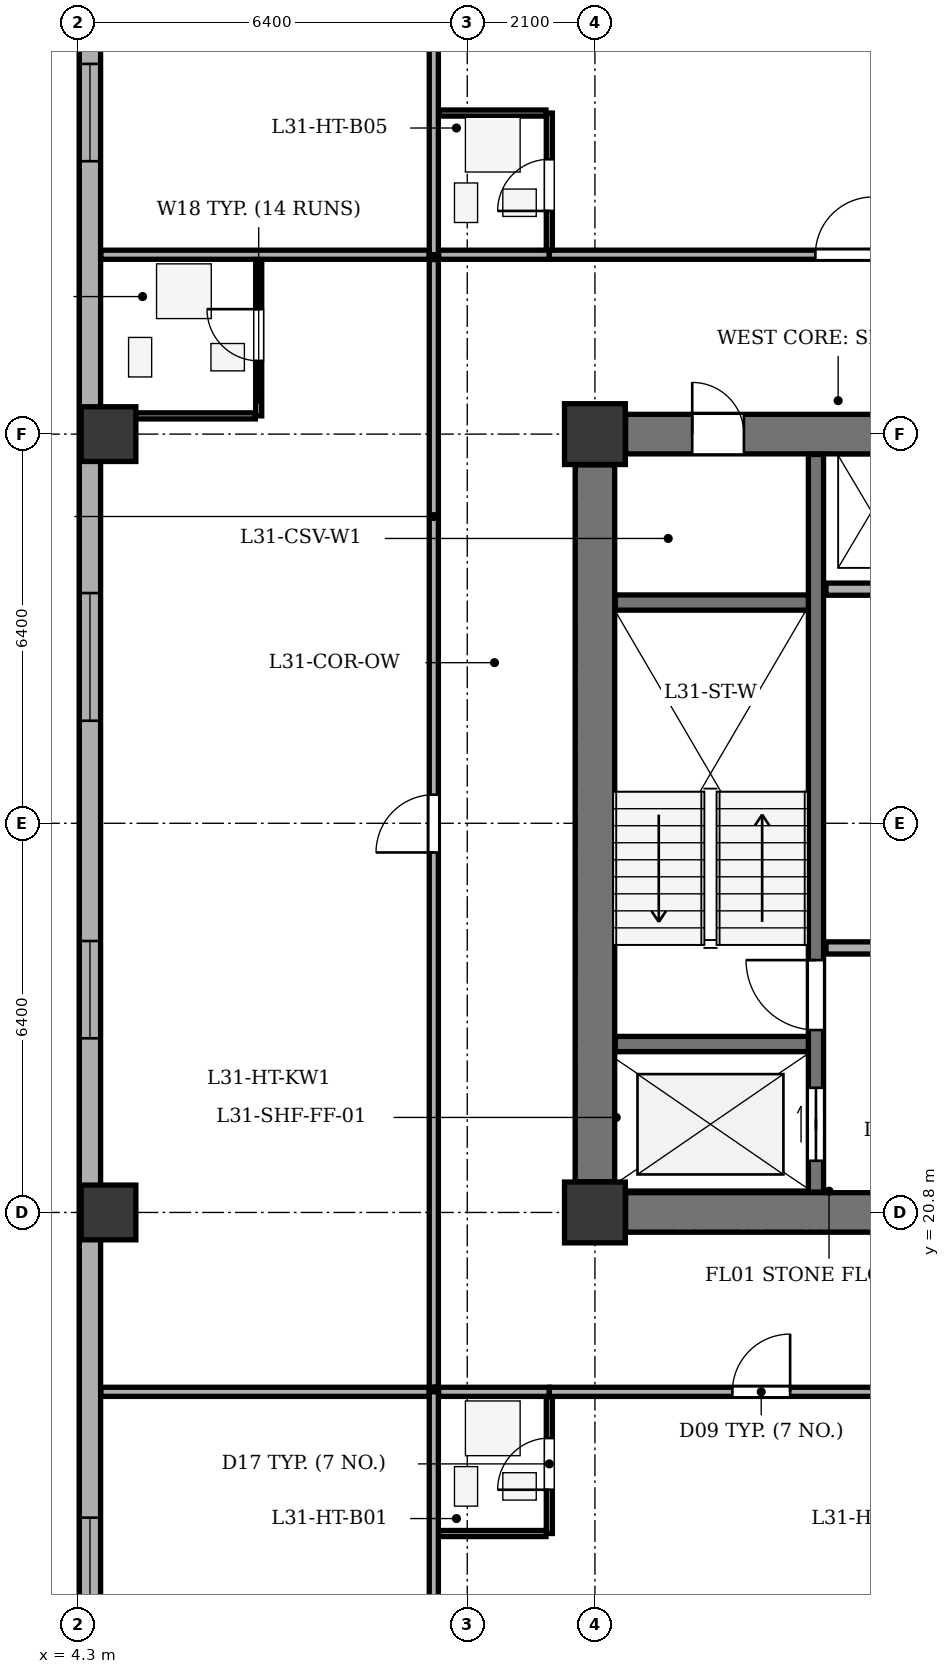
"""IFC4 building model, lengths in metres.
Left out: names, types, materials, properties, quantities, classifications, styles, units other than length and angle.
Written with IfcOpenShell. Run it as: python <this file> out.ifc"""

import sys

from ifc_helpers import new_model, si_unit, direction, frame, frame_2d, origin, origin_2d, place, context, subcontext, project, spatial, rectangle, extrude, element, fill, save


model = new_model("IFC4")
c1 = context("Model", 3, precision=1e-05, world=origin(), true_north=direction((0.0, 1.0)))
c2 = subcontext(c1, "Body", "Model", "MODEL_VIEW")
j1 = project(units=[si_unit("LENGTHUNIT", "METRE"), si_unit("PLANEANGLEUNIT", "RADIAN")], contexts=[c1])
p1 = place(None, origin())
s1 = spatial("IfcSite", under=j1, at=p1, CompositionType="ELEMENT")
p2 = place(p1, origin())
s2 = spatial("IfcBuilding", under=s1, at=p2, CompositionType="ELEMENT")
p3 = place(p2, frame((0.0, 0.0, 127.3)))
s3 = spatial("IfcBuildingStorey", under=s2, at=p3, CompositionType="ELEMENT", Elevation=127.3)
for number, where, z_axis, x_axis in (
    (1, (12.8, 20.8, 0.0), (0.0, 0.0, 1.0), (1.0, 0.0, 0.0)),
    (2, (12.8, 33.6, 0.0), (0.0, 0.0, 1.0), (1.0, 0.0, 0.0)),
):
    element("IfcColumn", number, at=place(p3, frame(where, z_axis=z_axis, x_axis=x_axis)), inside=s3, PredefinedType="COLUMN", context=c2, shape_type="SweptSolid", body=[
        extrude(rectangle(XDim=1.0, YDim=1.0, at=origin_2d()), origin(), (0.0, 0.0, 1.0), 3.5),
    ])
for number, where, z_axis, x_axis in (
    (3, (4.8, 20.8, 0.0), (0.0, 0.0, 1.0), (1.0, 0.0, 0.0)),
    (4, (4.8, 33.6, 0.0), (0.0, 0.0, 1.0), (1.0, 0.0, 0.0)),
):
    element("IfcColumn", number, at=place(p3, frame(where, z_axis=z_axis, x_axis=x_axis)), inside=s3, PredefinedType="COLUMN", context=c2, shape_type="SweptSolid", body=[
        extrude(rectangle(XDim=0.9, YDim=0.9, at=origin_2d()), origin(), (0.0, 0.0, 1.0), 3.5),
    ])
p4 = place(p3, frame((4.495, 6.5, 0.0), z_axis=(0.0, 0.0, 1.0), x_axis=(0.0, 1.0, 0.0)))
e5 = element("IfcWall", 5, at=p4, inside=s3, PredefinedType="STANDARD", context=c2, shape_type="SweptSolid", body=[
    extrude(rectangle(XDim=35.0, YDim=0.35, at=frame_2d((17.5, 0.0))), origin(), (0.0, 0.0, 1.0), 2.785),
])
p5 = place(p4, frame((2.595, 0.0, 0.75)))
e6 = element("IfcOpeningElement", 6, at=p5, cuts=e5, PredefinedType="OPENING", context=c2, shape_type="SweptSolid", body=[
    extrude(rectangle(XDim=1.6, YDim=1.75, at=frame_2d((0.8, 0.875))), frame((0.0, 0.185, 0.0), z_axis=(0.0, -1.0, 0.0), x_axis=(1.0, 0.0, 0.0)), (0.0, 0.0, 1.0), 0.37),
])
p6 = place(p4, frame((7.181, 0.0, 0.75)))
e7 = element("IfcOpeningElement", 7, at=p6, cuts=e5, PredefinedType="OPENING", context=c2, shape_type="SweptSolid", body=[
    extrude(rectangle(XDim=2.1, YDim=1.75, at=frame_2d((1.05, 0.875))), frame((0.0, 0.185, 0.0), z_axis=(0.0, -1.0, 0.0), x_axis=(1.0, 0.0, 0.0)), (0.0, 0.0, 1.0), 0.37),
])
p7 = place(p4, frame((17.164, 0.0, 0.75)))
e8 = element("IfcOpeningElement", 8, at=p7, cuts=e5, PredefinedType="OPENING", context=c2, shape_type="SweptSolid", body=[
    extrude(rectangle(XDim=1.6, YDim=1.75, at=frame_2d((0.8, 0.875))), frame((0.0, 0.185, 0.0), z_axis=(0.0, -1.0, 0.0), x_axis=(1.0, 0.0, 0.0)), (0.0, 0.0, 1.0), 0.37),
])
p8 = place(p4, frame((22.386, 0.0, 0.75)))
e9 = element("IfcOpeningElement", 9, at=p8, cuts=e5, PredefinedType="OPENING", context=c2, shape_type="SweptSolid", body=[
    extrude(rectangle(XDim=2.1, YDim=1.75, at=frame_2d((1.05, 0.875))), frame((0.0, 0.185, 0.0), z_axis=(0.0, -1.0, 0.0), x_axis=(1.0, 0.0, 0.0)), (0.0, 0.0, 1.0), 0.37),
])
p9 = place(p4, frame((31.588, 0.0, 0.75)))
e10 = element("IfcOpeningElement", 10, at=p9, cuts=e5, PredefinedType="OPENING", context=c2, shape_type="SweptSolid", body=[
    extrude(rectangle(XDim=1.6, YDim=1.75, at=frame_2d((0.8, 0.875))), frame((0.0, 0.185, 0.0), z_axis=(0.0, -1.0, 0.0), x_axis=(1.0, 0.0, 0.0)), (0.0, 0.0, 1.0), 0.37),
])
p10 = place(p3, frame((12.8, 21.305, 0.0), z_axis=(0.0, 0.0, 1.0), x_axis=(0.0, 1.0, 0.0)))
e11 = element("IfcWall", 11, at=p10, inside=s3, PredefinedType="SHEAR", context=c2, shape_type="SweptSolid", body=[
    extrude(rectangle(XDim=11.79, YDim=0.65, at=frame_2d((5.895, 0.0))), origin(), (0.0, 0.0, 1.0), 3.2),
])
p11 = place(p3, frame((13.305, 20.8, 0.0), z_axis=(0.0, 0.0, 1.0), x_axis=(1.0, 0.0, 0.0)))
e12 = element("IfcWall", 12, at=p11, inside=s3, PredefinedType="SHEAR", context=c2, shape_type="SweptSolid", body=[
    extrude(rectangle(XDim=6.99, YDim=0.65, at=frame_2d((3.495, 0.0))), origin(), (0.0, 0.0, 1.0), 3.2),
])
p12 = place(p3, frame((13.305, 33.6, 0.0), z_axis=(0.0, 0.0, 1.0), x_axis=(1.0, 0.0, 0.0)))
e13 = element("IfcWall", 13, at=p12, inside=s3, PredefinedType="SHEAR", context=c2, shape_type="SweptSolid", body=[
    extrude(rectangle(XDim=6.99, YDim=0.65, at=frame_2d((3.495, 0.0))), origin(), (0.0, 0.0, 1.0), 3.2),
])
p13 = place(p12, frame((1.095, 0.0, 0.0)))
e14 = element("IfcOpeningElement", 14, at=p13, cuts=e13, PredefinedType="OPENING", context=c2, shape_type="SweptSolid", body=[
    extrude(rectangle(XDim=0.85, YDim=2.02, at=frame_2d((0.425, 1.01))), frame((0.0, 0.335, 0.0), z_axis=(0.0, -1.0, 0.0), x_axis=(1.0, 0.0, 0.0)), (0.0, 0.0, 1.0), 0.67),
])
p14 = place(p3, frame((16.435, 21.135, 0.0), z_axis=(0.0, 0.0, 1.0), x_axis=(0.0, 1.0, 0.0)))
e15 = element("IfcWall", 15, at=p14, inside=s3, PredefinedType="SHEAR", context=c2, shape_type="SweptSolid", body=[
    extrude(rectangle(XDim=12.13, YDim=0.25, at=frame_2d((6.065, 0.0))), origin(), (0.0, 0.0, 1.0), 3.2),
])
p15 = place(p14, frame((0.515, 0.0, 0.0)))
e16 = element("IfcOpeningElement", 16, at=p15, cuts=e15, PredefinedType="OPENING", context=c2, shape_type="SweptSolid", body=[
    extrude(rectangle(XDim=1.2, YDim=2.15, at=frame_2d((0.6, 1.075))), frame((0.0, 0.135, 0.0), z_axis=(0.0, -1.0, 0.0), x_axis=(1.0, 0.0, 0.0)), (0.0, 0.0, 1.0), 0.27),
])
p16 = place(p14, frame((2.665, 0.0, 0.0)))
e17 = element("IfcOpeningElement", 17, at=p16, cuts=e15, PredefinedType="OPENING", context=c2, shape_type="SweptSolid", body=[
    extrude(rectangle(XDim=1.15, YDim=2.15, at=frame_2d((0.575, 1.075))), frame((0.0, 0.135, 0.0), z_axis=(0.0, -1.0, 0.0), x_axis=(1.0, 0.0, 0.0)), (0.0, 0.0, 1.0), 0.27),
])
for number, where, z_axis, x_axis in (
    (18, (13.135, 23.57, 0.0), (0.0, 0.0, 1.0), (1.0, 0.0, 0.0)),
    (19, (13.135, 30.83, 0.0), (0.0, 0.0, 1.0), (1.0, 0.0, 0.0)),
):
    element("IfcWall", number, at=place(p3, frame(where, z_axis=z_axis, x_axis=x_axis)), inside=s3, PredefinedType="SHEAR", context=c2, shape_type="SweptSolid", body=[
        extrude(rectangle(XDim=3.175, YDim=0.25, at=frame_2d((1.587, 0.0))), origin(), (0.0, 0.0, 1.0), 3.2),
    ])
for number, where, z_axis, x_axis in (
    (20, (16.6, 25.15, 0.0), (0.0, 0.0, 1.0), (1.0, 0.0, 0.0)),
    (21, (16.6, 31.05, 0.0), (0.0, 0.0, 1.0), (1.0, 0.0, 0.0)),
):
    element("IfcWall", number, at=place(p3, frame(where, z_axis=z_axis, x_axis=x_axis)), inside=s3, PredefinedType="SOLIDWALL", context=c2, shape_type="SweptSolid", body=[
        extrude(rectangle(XDim=3.85, YDim=0.2, at=frame_2d((1.925, 0.0))), origin(), (0.0, 0.0, 1.0), 3.2),
    ])
p17 = place(p3, frame((10.15, 1.875, 0.0), z_axis=(0.0, 0.0, 1.0), x_axis=(0.0, 1.0, 0.0)))
e22 = element("IfcWall", 22, at=p17, inside=s3, PredefinedType="PARTITIONING", context=c2, shape_type="SweptSolid", body=[
    extrude(rectangle(XDim=15.975, YDim=0.15, at=frame_2d((7.988, 0.0))), origin(), (0.0, 0.0, 1.0), 3.2),
])
p18 = place(p3, frame((10.23, 17.85, 0.0), z_axis=(0.0, 0.0, 1.0), x_axis=(1.0, 0.0, 0.0)))
e23 = element("IfcWall", 23, at=p18, inside=s3, PredefinedType="PARTITIONING", context=c2, shape_type="SweptSolid", body=[
    extrude(rectangle(XDim=1.82, YDim=0.15, at=frame_2d((0.91, 0.0))), origin(), (0.0, 0.0, 1.0), 3.2),
])
p19 = place(p3, frame((12.05, 17.85, 0.0), z_axis=(0.0, 0.0, 1.0), x_axis=(1.0, 0.0, 0.0)))
e24 = element("IfcWall", 24, at=p19, inside=s3, PredefinedType="PARTITIONING", context=c2, shape_type="SweptSolid", body=[
    extrude(rectangle(XDim=6.979, YDim=0.15, at=frame_2d((3.49, 0.0))), origin(), (0.0, 0.0, 1.0), 3.2),
])
p20 = place(p19, frame((3.01, 0.0, 0.0)))
e25 = element("IfcOpeningElement", 25, at=p20, cuts=e24, PredefinedType="OPENING", context=c2, shape_type="SweptSolid", body=[
    extrude(rectangle(XDim=0.95, YDim=2.1, at=frame_2d((0.475, 1.05))), frame((0.0, 0.085, 0.0), z_axis=(0.0, -1.0, 0.0), x_axis=(1.0, 0.0, 0.0)), (0.0, 0.0, 1.0), 0.17),
])
p21 = place(p3, frame((12.05, 15.52, 0.0), z_axis=(0.0, 0.0, 1.0), x_axis=(0.0, 1.0, 0.0)))
e26 = element("IfcWall", 26, at=p21, inside=s3, PredefinedType="PARTITIONING", context=c2, shape_type="SweptSolid", body=[
    extrude(rectangle(XDim=2.25, YDim=0.1, at=frame_2d((1.125, 0.0))), origin(), (0.0, 0.0, 1.0), 3.2),
])
p22 = place(p21, frame((0.72, 0.0, 0.0)))
e27 = element("IfcOpeningElement", 27, at=p22, cuts=e26, PredefinedType="OPENING", context=c2, shape_type="SweptSolid", body=[
    extrude(rectangle(XDim=0.85, YDim=2.05, at=frame_2d((0.425, 1.025))), frame((0.0, 0.06, 0.0), z_axis=(0.0, -1.0, 0.0), x_axis=(1.0, 0.0, 0.0)), (0.0, 0.0, 1.0), 0.12),
])
p23 = place(p3, frame((10.23, 15.52, 0.0), z_axis=(0.0, 0.0, 1.0), x_axis=(1.0, 0.0, 0.0)))
e28 = element("IfcWall", 28, at=p23, inside=s3, PredefinedType="PARTITIONING", context=c2, shape_type="SweptSolid", body=[
    extrude(rectangle(XDim=1.765, YDim=0.1, at=frame_2d((0.883, 0.0))), origin(), (0.0, 0.0, 1.0), 3.2),
])
p24 = place(p3, frame((10.15, 36.55, 0.0), z_axis=(0.0, 0.0, 1.0), x_axis=(0.0, 1.0, 0.0)))
e29 = element("IfcWall", 29, at=p24, inside=s3, PredefinedType="PARTITIONING", context=c2, shape_type="SweptSolid", body=[
    extrude(rectangle(XDim=9.575, YDim=0.15, at=frame_2d((4.788, 0.0))), origin(), (0.0, 0.0, 1.0), 3.2),
])
p25 = place(p3, frame((10.23, 36.55, 0.0), z_axis=(0.0, 0.0, 1.0), x_axis=(1.0, 0.0, 0.0)))
e30 = element("IfcWall", 30, at=p25, inside=s3, PredefinedType="PARTITIONING", context=c2, shape_type="SweptSolid", body=[
    extrude(rectangle(XDim=1.82, YDim=0.15, at=frame_2d((0.91, 0.0))), origin(), (0.0, 0.0, 1.0), 3.2),
])
p26 = place(p3, frame((12.05, 36.55, 0.0), z_axis=(0.0, 0.0, 1.0), x_axis=(1.0, 0.0, 0.0)))
e31 = element("IfcWall", 31, at=p26, inside=s3, PredefinedType="PARTITIONING", context=c2, shape_type="SweptSolid", body=[
    extrude(rectangle(XDim=9.711, YDim=0.15, at=frame_2d((4.855, 0.0))), origin(), (0.0, 0.0, 1.0), 3.2),
])
p27 = place(p26, frame((4.375, 0.0, 0.0)))
e32 = element("IfcOpeningElement", 32, at=p27, cuts=e31, PredefinedType="OPENING", context=c2, shape_type="SweptSolid", body=[
    extrude(rectangle(XDim=0.95, YDim=2.1, at=frame_2d((0.475, 1.05))), frame((0.0, 0.085, 0.0), z_axis=(0.0, -1.0, 0.0), x_axis=(1.0, 0.0, 0.0)), (0.0, 0.0, 1.0), 0.17),
])
p28 = place(p3, frame((12.05, 36.63, 0.0), z_axis=(0.0, 0.0, 1.0), x_axis=(0.0, 1.0, 0.0)))
e33 = element("IfcWall", 33, at=p28, inside=s3, PredefinedType="PARTITIONING", context=c2, shape_type="SweptSolid", body=[
    extrude(rectangle(XDim=2.25, YDim=0.1, at=frame_2d((1.125, 0.0))), origin(), (0.0, 0.0, 1.0), 3.2),
])
p29 = place(p28, frame((0.64, 0.0, 0.0)))
e34 = element("IfcOpeningElement", 34, at=p29, cuts=e33, PredefinedType="OPENING", context=c2, shape_type="SweptSolid", body=[
    extrude(rectangle(XDim=0.85, YDim=2.05, at=frame_2d((0.425, 1.025))), frame((0.0, 0.06, 0.0), z_axis=(0.0, -1.0, 0.0), x_axis=(1.0, 0.0, 0.0)), (0.0, 0.0, 1.0), 0.12),
])
p30 = place(p3, frame((10.23, 38.88, 0.0), z_axis=(0.0, 0.0, 1.0), x_axis=(1.0, 0.0, 0.0)))
e35 = element("IfcWall", 35, at=p30, inside=s3, PredefinedType="PARTITIONING", context=c2, shape_type="SweptSolid", body=[
    extrude(rectangle(XDim=1.765, YDim=0.1, at=frame_2d((0.883, 0.0))), origin(), (0.0, 0.0, 1.0), 3.2),
])
for number, where, z_axis, x_axis in (
    (36, (4.675, 17.85, 0.0), (0.0, 0.0, 1.0), (1.0, 0.0, 0.0)),
    (37, (4.675, 36.55, 0.0), (0.0, 0.0, 1.0), (1.0, 0.0, 0.0)),
):
    element("IfcWall", number, at=place(p3, frame(where, z_axis=z_axis, x_axis=x_axis)), inside=s3, PredefinedType="PARTITIONING", context=c2, shape_type="SweptSolid", body=[
        extrude(rectangle(XDim=5.395, YDim=0.15, at=frame_2d((2.698, 0.0))), origin(), (0.0, 0.0, 1.0), 3.2),
    ])
p31 = place(p3, frame((10.15, 17.93, 0.0), z_axis=(0.0, 0.0, 1.0), x_axis=(0.0, 1.0, 0.0)))
e38 = element("IfcWall", 38, at=p31, inside=s3, PredefinedType="PARTITIONING", context=c2, shape_type="SweptSolid", body=[
    extrude(rectangle(XDim=18.54, YDim=0.15, at=frame_2d((9.27, 0.0))), origin(), (0.0, 0.0, 1.0), 3.2),
])
p32 = place(p31, frame((8.79, 0.0, 0.0)))
e39 = element("IfcOpeningElement", 39, at=p32, cuts=e38, PredefinedType="OPENING", context=c2, shape_type="SweptSolid", body=[
    extrude(rectangle(XDim=0.95, YDim=2.1, at=frame_2d((0.475, 1.05))), frame((0.0, 0.085, 0.0), z_axis=(0.0, -1.0, 0.0), x_axis=(1.0, 0.0, 0.0)), (0.0, 0.0, 1.0), 0.17),
])
p33 = place(p3, frame((7.27, 33.9, 0.0), z_axis=(0.0, 0.0, 1.0), x_axis=(0.0, 1.0, 0.0)))
e40 = element("IfcWall", 40, at=p33, inside=s3, PredefinedType="PARTITIONING", context=c2, shape_type="SweptSolid", body=[
    extrude(rectangle(XDim=2.57, YDim=0.1, at=frame_2d((1.285, 0.0))), origin(), (0.0, 0.0, 1.0), 3.2),
])
p34 = place(p33, frame((0.905, 0.0, 0.0)))
e41 = element("IfcOpeningElement", 41, at=p34, cuts=e40, PredefinedType="OPENING", context=c2, shape_type="SweptSolid", body=[
    extrude(rectangle(XDim=0.85, YDim=2.05, at=frame_2d((0.425, 1.025))), frame((0.0, 0.06, 0.0), z_axis=(0.0, -1.0, 0.0), x_axis=(1.0, 0.0, 0.0)), (0.0, 0.0, 1.0), 0.12),
])
p35 = place(p3, frame((4.675, 33.9, 0.0), z_axis=(0.0, 0.0, 1.0), x_axis=(1.0, 0.0, 0.0)))
e42 = element("IfcWall", 42, at=p35, inside=s3, PredefinedType="PARTITIONING", context=c2, shape_type="SweptSolid", body=[
    extrude(rectangle(XDim=2.54, YDim=0.1, at=frame_2d((1.27, 0.0))), origin(), (0.0, 0.0, 1.0), 2.535),
])
p36 = place(p6, origin())
e43 = element("IfcWindow", 43, at=p36, inside=s3, PartitioningType="SINGLE_PANEL", PredefinedType="WINDOW", context=c2, shape_type="SweptSolid", body=[
    extrude(rectangle(XDim=2.1, YDim=1.75, at=frame_2d((1.05, 0.875))), frame((0.0, -0.01, 0.0), z_axis=(0.0, -1.0, 0.0), x_axis=(1.0, 0.0, 0.0)), (0.0, 0.0, 1.0), 0.06),
])
fill(e7, e43)
p37 = place(p7, origin())
e44 = element("IfcWindow", 44, at=p37, inside=s3, PartitioningType="SINGLE_PANEL", PredefinedType="WINDOW", context=c2, shape_type="SweptSolid", body=[
    extrude(rectangle(XDim=1.6, YDim=1.75, at=frame_2d((0.8, 0.875))), frame((0.0, -0.01, 0.0), z_axis=(0.0, -1.0, 0.0), x_axis=(1.0, 0.0, 0.0)), (0.0, 0.0, 1.0), 0.06),
])
fill(e8, e44)
p38 = place(p8, origin())
e45 = element("IfcWindow", 45, at=p38, inside=s3, PartitioningType="SINGLE_PANEL", PredefinedType="WINDOW", context=c2, shape_type="SweptSolid", body=[
    extrude(rectangle(XDim=2.1, YDim=1.75, at=frame_2d((1.05, 0.875))), frame((0.0, -0.01, 0.0), z_axis=(0.0, -1.0, 0.0), x_axis=(1.0, 0.0, 0.0)), (0.0, 0.0, 1.0), 0.06),
])
fill(e9, e45)
p39 = place(p9, origin())
e46 = element("IfcWindow", 46, at=p39, inside=s3, PartitioningType="SINGLE_PANEL", PredefinedType="WINDOW", context=c2, shape_type="SweptSolid", body=[
    extrude(rectangle(XDim=1.6, YDim=1.75, at=frame_2d((0.8, 0.875))), frame((0.0, -0.01, 0.0), z_axis=(0.0, -1.0, 0.0), x_axis=(1.0, 0.0, 0.0)), (0.0, 0.0, 1.0), 0.06),
])
fill(e10, e46)
p40 = place(p13, origin())
e47 = element("IfcDoor", 47, at=p40, inside=s3, OperationType="SINGLE_SWING_LEFT", PredefinedType="DOOR", context=c2, shape_type="SweptSolid", body=[
    extrude(rectangle(XDim=0.85, YDim=2.02, at=frame_2d((0.425, 1.01))), frame((0.0, 0.025, 0.0), z_axis=(0.0, -1.0, 0.0), x_axis=(1.0, 0.0, 0.0)), (0.0, 0.0, 1.0), 0.05),
])
fill(e14, e47)
p41 = place(p15, origin())
e48 = element("IfcDoor", 48, at=p41, inside=s3, OperationType="DOUBLE_DOOR_SLIDING", PredefinedType="DOOR", context=c2, shape_type="SweptSolid", body=[
    extrude(rectangle(XDim=1.2, YDim=2.15, at=frame_2d((0.6, 1.075))), frame((0.0, 0.025, 0.0), z_axis=(0.0, -1.0, 0.0), x_axis=(1.0, 0.0, 0.0)), (0.0, 0.0, 1.0), 0.05),
])
fill(e16, e48)
p42 = place(p16, origin())
e49 = element("IfcDoor", 49, at=p42, inside=s3, OperationType="SINGLE_SWING_RIGHT", PredefinedType="DOOR", context=c2, shape_type="SweptSolid", body=[
    extrude(rectangle(XDim=1.15, YDim=2.15, at=frame_2d((0.575, 1.075))), frame((0.0, 0.025, 0.0), z_axis=(0.0, -1.0, 0.0), x_axis=(1.0, 0.0, 0.0)), (0.0, 0.0, 1.0), 0.05),
])
fill(e17, e49)
p43 = place(p22, origin())
e50 = element("IfcDoor", 50, at=p43, inside=s3, OperationType="SINGLE_SWING_LEFT", PredefinedType="DOOR", context=c2, shape_type="SweptSolid", body=[
    extrude(rectangle(XDim=0.85, YDim=2.05, at=frame_2d((0.425, 1.025))), frame((0.0, 0.025, 0.0), z_axis=(0.0, -1.0, 0.0), x_axis=(1.0, 0.0, 0.0)), (0.0, 0.0, 1.0), 0.05),
])
fill(e27, e50)
p44 = place(p20, origin())
e51 = element("IfcDoor", 51, at=p44, inside=s3, OperationType="SINGLE_SWING_RIGHT", PredefinedType="DOOR", context=c2, shape_type="SweptSolid", body=[
    extrude(rectangle(XDim=0.95, YDim=2.1, at=frame_2d((0.475, 1.05))), frame((0.0, 0.025, 0.0), z_axis=(0.0, -1.0, 0.0), x_axis=(1.0, 0.0, 0.0)), (0.0, 0.0, 1.0), 0.05),
])
fill(e25, e51)
p45 = place(p29, origin())
e52 = element("IfcDoor", 52, at=p45, inside=s3, OperationType="SINGLE_SWING_LEFT", PredefinedType="DOOR", context=c2, shape_type="SweptSolid", body=[
    extrude(rectangle(XDim=0.85, YDim=2.05, at=frame_2d((0.425, 1.025))), frame((0.0, 0.025, 0.0), z_axis=(0.0, -1.0, 0.0), x_axis=(1.0, 0.0, 0.0)), (0.0, 0.0, 1.0), 0.05),
])
fill(e34, e52)
p46 = place(p27, origin())
e53 = element("IfcDoor", 53, at=p46, inside=s3, OperationType="SINGLE_SWING_RIGHT", PredefinedType="DOOR", context=c2, shape_type="SweptSolid", body=[
    extrude(rectangle(XDim=0.95, YDim=2.1, at=frame_2d((0.475, 1.05))), frame((0.0, 0.025, 0.0), z_axis=(0.0, -1.0, 0.0), x_axis=(1.0, 0.0, 0.0)), (0.0, 0.0, 1.0), 0.05),
])
fill(e32, e53)
p47 = place(p34, origin())
e54 = element("IfcDoor", 54, at=p47, inside=s3, OperationType="SINGLE_SWING_RIGHT", PredefinedType="DOOR", context=c2, shape_type="SweptSolid", body=[
    extrude(rectangle(XDim=0.85, YDim=2.05, at=frame_2d((0.425, 1.025))), frame((0.0, 0.025, 0.0), z_axis=(0.0, -1.0, 0.0), x_axis=(1.0, 0.0, 0.0)), (0.0, 0.0, 1.0), 0.05),
])
fill(e41, e54)
p48 = place(p32, origin())
e55 = element("IfcDoor", 55, at=p48, inside=s3, OperationType="SINGLE_SWING_LEFT", PredefinedType="DOOR", context=c2, shape_type="SweptSolid", body=[
    extrude(rectangle(XDim=0.95, YDim=2.1, at=frame_2d((0.475, 1.05))), frame((0.0, 0.025, 0.0), z_axis=(0.0, -1.0, 0.0), x_axis=(1.0, 0.0, 0.0)), (0.0, 0.0, 1.0), 0.05),
])
fill(e39, e55)
save(model, sys.argv[1])
